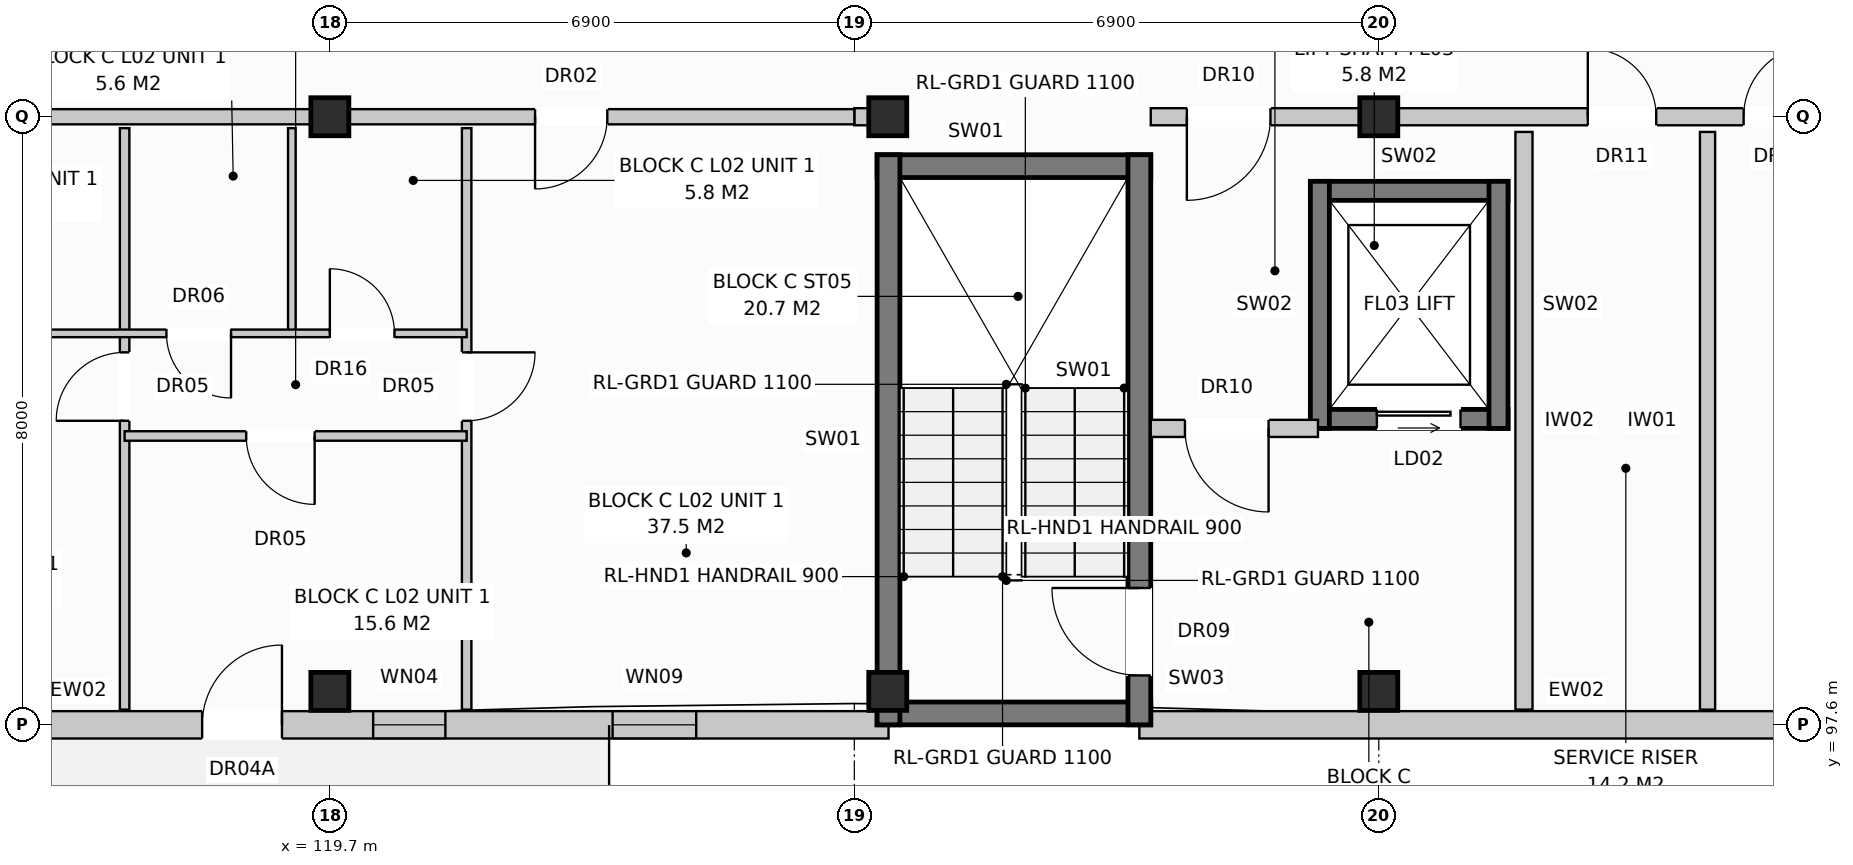
"""IFC4 building model, lengths in metres.
Left out: names, types, materials, properties, quantities, classifications, styles, units other than length and angle.
Written with IfcOpenShell. Run it as: python <this file> out.ifc"""

import sys

from ifc_helpers import new_model, si_unit, direction, frame, frame_2d, origin, origin_with_axes, origin_2d, place, context, subcontext, project, spatial, rectangle, extrude, element, fill, save


model = new_model("IFC4")
c1 = context("Model", 3, precision=1e-05, world=origin(), true_north=direction((0.0, 1.0)))
c2 = subcontext(c1, "Body", "Model", "MODEL_VIEW")
j1 = project(units=[si_unit("LENGTHUNIT", "METRE"), si_unit("PLANEANGLEUNIT", "RADIAN")], contexts=[c1])
p1 = place(None, origin())
s1 = spatial("IfcSite", under=j1, at=p1, CompositionType="ELEMENT")
p2 = place(p1, origin())
s2 = spatial("IfcBuilding", under=s1, at=p2, CompositionType="ELEMENT")
p3 = place(p2, frame((0.0, 0.0, 8.0)))
s3 = spatial("IfcBuildingStorey", under=s2, at=p3, CompositionType="ELEMENT", Elevation=8.0)
for number, where, z_axis, x_axis in (
    (1, (119.7, 98.04, 0.0), (0.0, 0.0, 1.0), (1.0, 0.0, 0.0)),
    (2, (119.7, 105.6, 0.0), (0.0, 0.0, 1.0), (1.0, 0.0, 0.0)),
    (3, (127.04, 98.04, 0.0), (0.0, 0.0, 1.0), (1.0, 0.0, 0.0)),
    (4, (127.04, 105.6, 0.0), (0.0, 0.0, 1.0), (1.0, 0.0, 0.0)),
    (5, (133.5, 98.04, 0.0), (0.0, 0.0, 1.0), (1.0, 0.0, 0.0)),
    (6, (133.5, 105.6, 0.0), (0.0, 0.0, 1.0), (1.0, 0.0, 0.0)),
):
    element("IfcColumn", number, at=place(p3, frame(where, z_axis=z_axis, x_axis=x_axis)), inside=s3, PredefinedType="COLUMN", context=c2, shape_type="SweptSolid", body=[
        extrude(rectangle(XDim=0.5, YDim=0.5, at=origin_2d()), origin(), (0.0, 0.0, 1.0), 3.2),
    ])
p4 = place(p3, frame((112.97, 97.6, 0.0), z_axis=(0.0, 0.0, 1.0), x_axis=(1.0, 0.0, 0.0)))
e7 = element("IfcWall", 7, at=p4, inside=s3, PredefinedType="STANDARD", context=c2, shape_type="SweptSolid", body=[
    extrude(rectangle(XDim=14.08, YDim=0.36, at=frame_2d((7.04, 0.0))), origin(), (0.0, 0.0, 1.0), 2.94),
])
p5 = place(p4, frame((5.05, 0.0, 0.0)))
e8 = element("IfcOpeningElement", 8, at=p5, cuts=e7, PredefinedType="OPENING", context=c2, shape_type="SweptSolid", body=[
    extrude(rectangle(XDim=1.05, YDim=2.12, at=frame_2d((0.525, 1.06))), frame((0.0, 0.192, 0.0), z_axis=(0.0, -1.0, 0.0), x_axis=(1.0, 0.0, 0.0)), (0.0, 0.0, 1.0), 0.384),
])
p6 = place(p4, frame((1.45, 0.0, 0.72)))
e9 = element("IfcOpeningElement", 9, at=p6, cuts=e7, PredefinedType="OPENING", context=c2, shape_type="SweptSolid", body=[
    extrude(rectangle(XDim=1.1, YDim=1.5, at=frame_2d((0.55, 0.75))), frame((0.0, 0.192, 0.0), z_axis=(0.0, -1.0, 0.0), x_axis=(1.0, 0.0, 0.0)), (0.0, 0.0, 1.0), 0.384),
])
p7 = place(p4, frame((7.3, 0.0, 0.9)))
e10 = element("IfcOpeningElement", 10, at=p7, cuts=e7, PredefinedType="OPENING", context=c2, shape_type="SweptSolid", body=[
    extrude(rectangle(XDim=0.95, YDim=1.55, at=frame_2d((0.475, 0.775))), frame((0.0, 0.192, 0.0), z_axis=(0.0, -1.0, 0.0), x_axis=(1.0, 0.0, 0.0)), (0.0, 0.0, 1.0), 0.384),
])
p8 = place(p4, frame((10.45, 0.0, 0.72)))
e11 = element("IfcOpeningElement", 11, at=p8, cuts=e7, PredefinedType="OPENING", context=c2, shape_type="SweptSolid", body=[
    extrude(rectangle(XDim=1.1, YDim=1.5, at=frame_2d((0.55, 0.75))), frame((0.0, 0.192, 0.0), z_axis=(0.0, -1.0, 0.0), x_axis=(1.0, 0.0, 0.0)), (0.0, 0.0, 1.0), 0.384),
])
p9 = place(p3, frame((130.35, 97.6, 0.0), z_axis=(0.0, 0.0, 1.0), x_axis=(1.0, 0.0, 0.0)))
e12 = element("IfcWall", 12, at=p9, inside=s3, PredefinedType="STANDARD", context=c2, shape_type="SweptSolid", body=[
    extrude(rectangle(XDim=17.4, YDim=0.36, at=frame_2d((8.7, 0.0))), origin(), (0.0, 0.0, 1.0), 2.94),
])
p10 = place(p9, frame((11.812, 0.0, 0.0)))
e13 = element("IfcOpeningElement", 13, at=p10, cuts=e12, PredefinedType="OPENING", context=c2, shape_type="SweptSolid", body=[
    extrude(rectangle(XDim=1.05, YDim=2.12, at=frame_2d((0.525, 1.06))), frame((0.0, 0.192, 0.0), z_axis=(0.0, -1.0, 0.0), x_axis=(1.0, 0.0, 0.0)), (0.0, 0.0, 1.0), 0.384),
])
p11 = place(p9, frame((14.87, 0.0, 0.72)))
e14 = element("IfcOpeningElement", 14, at=p11, cuts=e12, PredefinedType="OPENING", context=c2, shape_type="SweptSolid", body=[
    extrude(rectangle(XDim=1.1, YDim=1.5, at=frame_2d((0.55, 0.75))), frame((0.0, 0.192, 0.0), z_axis=(0.0, -1.0, 0.0), x_axis=(1.0, 0.0, 0.0)), (0.0, 0.0, 1.0), 0.384),
])
for number, where, z_axis, x_axis in (
    (15, (126.9, 97.75, 0.0), (0.0, 0.0, 1.0), (1.0, 0.0, 0.0)),
    (16, (126.9, 104.95, 0.0), (0.0, 0.0, 1.0), (1.0, 0.0, 0.0)),
):
    element("IfcWall", number, at=place(p3, frame(where, z_axis=z_axis, x_axis=x_axis)), inside=s3, PredefinedType="SHEAR", context=c2, shape_type="SweptSolid", body=[
        extrude(rectangle(XDim=3.6, YDim=0.3, at=frame_2d((1.8, 0.0))), origin(), (0.0, 0.0, 1.0), 2.94),
    ])
p12 = place(p3, frame((127.05, 97.6, 0.0), z_axis=(0.0, 0.0, 1.0), x_axis=(0.0, 1.0, 0.0)))
e17 = element("IfcWall", 17, at=p12, inside=s3, PredefinedType="SHEAR", context=c2, shape_type="SweptSolid", body=[
    extrude(rectangle(XDim=7.5, YDim=0.3, at=frame_2d((3.75, 0.0))), origin(), (0.0, 0.0, 1.0), 2.94),
])
p13 = place(p3, frame((130.35, 97.6, 0.0), z_axis=(0.0, 0.0, 1.0), x_axis=(0.0, 1.0, 0.0)))
e18 = element("IfcWall", 18, at=p13, inside=s3, PredefinedType="SHEAR", context=c2, shape_type="SweptSolid", body=[
    extrude(rectangle(XDim=7.5, YDim=0.3, at=frame_2d((3.75, 0.0))), origin(), (0.0, 0.0, 1.0), 2.94),
])
p14 = place(p13, frame((0.65, 0.0, 0.0)))
e19 = element("IfcOpeningElement", 19, at=p14, cuts=e18, PredefinedType="OPENING", context=c2, shape_type="SweptSolid", body=[
    extrude(rectangle(XDim=1.15, YDim=2.15, at=frame_2d((0.575, 1.075))), frame((0.0, 0.162, 0.0), z_axis=(0.0, -1.0, 0.0), x_axis=(1.0, 0.0, 0.0)), (0.0, 0.0, 1.0), 0.324),
])
p15 = place(p3, frame((132.6, 101.625, 0.0), z_axis=(0.0, 0.0, 1.0), x_axis=(1.0, 0.0, 0.0)))
e20 = element("IfcWall", 20, at=p15, inside=s3, PredefinedType="SHEAR", context=c2, shape_type="SweptSolid", body=[
    extrude(rectangle(XDim=2.6, YDim=0.25, at=frame_2d((1.3, 0.0))), origin(), (0.0, 0.0, 1.0), 2.94),
])
p16 = place(p15, frame((0.875, 0.0, 0.0)))
e21 = element("IfcOpeningElement", 21, at=p16, cuts=e20, PredefinedType="OPENING", context=c2, shape_type="SweptSolid", body=[
    extrude(rectangle(XDim=1.1, YDim=2.1, at=frame_2d((0.55, 1.05))), frame((0.0, 0.137, 0.0), z_axis=(0.0, -1.0, 0.0), x_axis=(1.0, 0.0, 0.0)), (0.0, 0.0, 1.0), 0.274),
])
p17 = place(p3, frame((132.6, 104.625, 0.0), z_axis=(0.0, 0.0, 1.0), x_axis=(1.0, 0.0, 0.0)))
e22 = element("IfcWall", 22, at=p17, inside=s3, PredefinedType="SHEAR", context=c2, shape_type="SweptSolid", body=[
    extrude(rectangle(XDim=2.6, YDim=0.25, at=frame_2d((1.3, 0.0))), origin(), (0.0, 0.0, 1.0), 2.94),
])
for number, where, z_axis, x_axis in (
    (23, (132.725, 101.5, 0.0), (0.0, 0.0, 1.0), (0.0, 1.0, 0.0)),
    (24, (135.075, 101.5, 0.0), (0.0, 0.0, 1.0), (0.0, 1.0, 0.0)),
):
    element("IfcWall", number, at=place(p3, frame(where, z_axis=z_axis, x_axis=x_axis)), inside=s3, PredefinedType="SHEAR", context=c2, shape_type="SweptSolid", body=[
        extrude(rectangle(XDim=3.25, YDim=0.25, at=frame_2d((1.625, 0.0))), origin(), (0.0, 0.0, 1.0), 2.94),
    ])
p18 = place(p3, frame((135.41, 97.8, 0.0), z_axis=(0.0, 0.0, 1.0), x_axis=(0.0, 1.0, 0.0)))
e25 = element("IfcWall", 25, at=p18, inside=s3, PredefinedType="PARTITIONING", context=c2, shape_type="SweptSolid", body=[
    extrude(rectangle(XDim=7.6, YDim=0.225, at=frame_2d((3.8, 0.0))), origin(), (0.0, 0.0, 1.0), 2.59),
])
p19 = place(p3, frame((130.5, 101.5, 0.0), z_axis=(0.0, 0.0, 1.0), x_axis=(1.0, 0.0, 0.0)))
e26 = element("IfcWall", 26, at=p19, inside=s3, PredefinedType="PARTITIONING", context=c2, shape_type="SweptSolid", body=[
    extrude(rectangle(XDim=2.2, YDim=0.225, at=frame_2d((1.1, 0.0))), origin(), (0.0, 0.0, 1.0), 2.94),
])
p20 = place(p19, frame((0.45, 0.0, 0.0)))
e27 = element("IfcOpeningElement", 27, at=p20, cuts=e26, PredefinedType="OPENING", context=c2, shape_type="SweptSolid", body=[
    extrude(rectangle(XDim=1.1, YDim=2.15, at=frame_2d((0.55, 1.075))), frame((0.0, 0.125, 0.0), z_axis=(0.0, -1.0, 0.0), x_axis=(1.0, 0.0, 0.0)), (0.0, 0.0, 1.0), 0.249),
])
p21 = place(p3, frame((126.6, 105.6, 0.0), z_axis=(0.0, 0.0, 1.0), x_axis=(1.0, 0.0, 0.0)))
e28 = element("IfcWall", 28, at=p21, inside=s3, PredefinedType="PARTITIONING", context=c2, shape_type="SweptSolid", body=[
    extrude(rectangle(XDim=0.3, YDim=0.225, at=frame_2d((0.15, 0.0))), origin(), (0.0, 0.0, 1.0), 2.94),
])
p22 = place(p3, frame((137.825, 97.8, 0.0), z_axis=(0.0, 0.0, 1.0), x_axis=(0.0, 1.0, 0.0)))
e29 = element("IfcWall", 29, at=p22, inside=s3, PredefinedType="PARTITIONING", context=c2, shape_type="SweptSolid", body=[
    extrude(rectangle(XDim=7.6, YDim=0.2, at=frame_2d((3.8, 0.0))), origin(), (0.0, 0.0, 1.0), 2.94),
])
p23 = place(p3, frame((130.5, 105.6, 0.0), z_axis=(0.0, 0.0, 1.0), x_axis=(1.0, 0.0, 0.0)))
e30 = element("IfcWall", 30, at=p23, inside=s3, PredefinedType="PARTITIONING", context=c2, shape_type="SweptSolid", body=[
    extrude(rectangle(XDim=9.9, YDim=0.225, at=frame_2d((4.95, 0.0))), origin(), (0.0, 0.0, 1.0), 2.38),
])
p24 = place(p23, frame((0.475, 0.0, 0.0)))
e31 = element("IfcOpeningElement", 31, at=p24, cuts=e30, PredefinedType="OPENING", context=c2, shape_type="SweptSolid", body=[
    extrude(rectangle(XDim=1.1, YDim=2.15, at=frame_2d((0.55, 1.075))), frame((0.0, 0.125, 0.0), z_axis=(0.0, -1.0, 0.0), x_axis=(1.0, 0.0, 0.0)), (0.0, 0.0, 1.0), 0.249),
])
p25 = place(p23, frame((5.75, 0.0, 0.0)))
e32 = element("IfcOpeningElement", 32, at=p25, cuts=e30, PredefinedType="OPENING", context=c2, shape_type="SweptSolid", body=[
    extrude(rectangle(XDim=0.9, YDim=2.1, at=frame_2d((0.45, 1.05))), frame((0.0, 0.125, 0.0), z_axis=(0.0, -1.0, 0.0), x_axis=(1.0, 0.0, 0.0)), (0.0, 0.0, 1.0), 0.249),
])
p26 = place(p23, frame((7.8, 0.0, 0.0)))
e33 = element("IfcOpeningElement", 33, at=p26, cuts=e30, PredefinedType="OPENING", context=c2, shape_type="SweptSolid", body=[
    extrude(rectangle(XDim=0.95, YDim=2.15, at=frame_2d((0.475, 1.075))), frame((0.0, 0.125, 0.0), z_axis=(0.0, -1.0, 0.0), x_axis=(1.0, 0.0, 0.0)), (0.0, 0.0, 1.0), 0.249),
])
p27 = place(p3, frame((112.8, 105.6, 0.0), z_axis=(0.0, 0.0, 1.0), x_axis=(1.0, 0.0, 0.0)))
e34 = element("IfcWall", 34, at=p27, inside=s3, PredefinedType="PARTITIONING", context=c2, shape_type="SweptSolid", body=[
    extrude(rectangle(XDim=13.8, YDim=0.2, at=frame_2d((6.9, 0.0))), origin(), (0.0, 0.0, 1.0), 2.38),
])
p28 = place(p27, frame((9.6, 0.0, 0.0)))
e35 = element("IfcOpeningElement", 35, at=p28, cuts=e34, PredefinedType="OPENING", context=c2, shape_type="SweptSolid", body=[
    extrude(rectangle(XDim=0.95, YDim=2.15, at=frame_2d((0.475, 1.075))), frame((0.0, 0.112, 0.0), z_axis=(0.0, -1.0, 0.0), x_axis=(1.0, 0.0, 0.0)), (0.0, 0.0, 1.0), 0.224),
])
p29 = place(p3, frame((121.5, 105.45, 0.0), z_axis=(0.0, 0.0, 1.0), x_axis=(0.0, -1.0, 0.0)))
e36 = element("IfcWall", 36, at=p29, inside=s3, PredefinedType="PARTITIONING", context=c2, shape_type="SweptSolid", body=[
    extrude(rectangle(XDim=7.65, YDim=0.125, at=frame_2d((3.825, 0.0))), origin(), (0.0, 0.0, 1.0), 2.94),
])
p30 = place(p29, frame((2.95, 0.0, 0.0)))
e37 = element("IfcOpeningElement", 37, at=p30, cuts=e36, PredefinedType="OPENING", context=c2, shape_type="SweptSolid", body=[
    extrude(rectangle(XDim=0.9, YDim=2.1, at=frame_2d((0.45, 1.05))), frame((0.0, 0.074, 0.0), z_axis=(0.0, -1.0, 0.0), x_axis=(1.0, 0.0, 0.0)), (0.0, 0.0, 1.0), 0.149),
])
p31 = place(p3, frame((117.0, 105.45, 0.0), z_axis=(0.0, 0.0, 1.0), x_axis=(0.0, -1.0, 0.0)))
e38 = element("IfcWall", 38, at=p31, inside=s3, PredefinedType="PARTITIONING", context=c2, shape_type="SweptSolid", body=[
    extrude(rectangle(XDim=7.65, YDim=0.125, at=frame_2d((3.825, 0.0))), origin(), (0.0, 0.0, 1.0), 2.94),
])
p32 = place(p31, frame((2.95, 0.0, 0.0)))
e39 = element("IfcOpeningElement", 39, at=p32, cuts=e38, PredefinedType="OPENING", context=c2, shape_type="SweptSolid", body=[
    extrude(rectangle(XDim=0.9, YDim=2.1, at=frame_2d((0.45, 1.05))), frame((0.0, 0.074, 0.0), z_axis=(0.0, -1.0, 0.0), x_axis=(1.0, 0.0, 0.0)), (0.0, 0.0, 1.0), 0.149),
])
p33 = place(p3, frame((119.2, 105.45, 0.0), z_axis=(0.0, 0.0, 1.0), x_axis=(0.0, -1.0, 0.0)))
e40 = element("IfcWall", 40, at=p33, inside=s3, PredefinedType="PARTITIONING", context=c2, shape_type="SweptSolid", body=[
    extrude(rectangle(XDim=2.7, YDim=0.1, at=frame_2d((1.35, 0.0))), origin(), (0.0, 0.0, 1.0), 2.94),
])
p34 = place(p3, frame((112.9, 102.75, 0.0), z_axis=(0.0, 0.0, 1.0), x_axis=(1.0, 0.0, 0.0)))
e41 = element("IfcWall", 41, at=p34, inside=s3, PredefinedType="PARTITIONING", context=c2, shape_type="SweptSolid", body=[
    extrude(rectangle(XDim=8.6, YDim=0.1, at=frame_2d((4.3, 0.0))), origin(), (0.0, 0.0, 1.0), 2.94),
])
p35 = place(p34, frame((1.4, 0.0, 0.0)))
e42 = element("IfcOpeningElement", 42, at=p35, cuts=e41, PredefinedType="OPENING", context=c2, shape_type="SweptSolid", body=[
    extrude(rectangle(XDim=0.85, YDim=2.05, at=frame_2d((0.425, 1.025))), frame((0.0, 0.062, 0.0), z_axis=(0.0, -1.0, 0.0), x_axis=(1.0, 0.0, 0.0)), (0.0, 0.0, 1.0), 0.124),
])
p36 = place(p34, frame((4.65, 0.0, 0.0)))
e43 = element("IfcOpeningElement", 43, at=p36, cuts=e41, PredefinedType="OPENING", context=c2, shape_type="SweptSolid", body=[
    extrude(rectangle(XDim=0.85, YDim=2.05, at=frame_2d((0.425, 1.025))), frame((0.0, 0.062, 0.0), z_axis=(0.0, -1.0, 0.0), x_axis=(1.0, 0.0, 0.0)), (0.0, 0.0, 1.0), 0.124),
])
p37 = place(p34, frame((6.8, 0.0, 0.0)))
e44 = element("IfcOpeningElement", 44, at=p37, cuts=e41, PredefinedType="OPENING", context=c2, shape_type="SweptSolid", body=[
    extrude(rectangle(XDim=0.85, YDim=2.1, at=frame_2d((0.425, 1.05))), frame((0.0, 0.062, 0.0), z_axis=(0.0, -1.0, 0.0), x_axis=(1.0, 0.0, 0.0)), (0.0, 0.0, 1.0), 0.124),
])
p38 = place(p3, frame((117.0, 101.4, 0.0), z_axis=(0.0, 0.0, 1.0), x_axis=(1.0, 0.0, 0.0)))
e45 = element("IfcWall", 45, at=p38, inside=s3, PredefinedType="PARTITIONING", context=c2, shape_type="SweptSolid", body=[
    extrude(rectangle(XDim=4.5, YDim=0.125, at=frame_2d((2.25, 0.0))), origin(), (0.0, 0.0, 1.0), 2.94),
])
p39 = place(p38, frame((1.6, 0.0, 0.0)))
e46 = element("IfcOpeningElement", 46, at=p39, cuts=e45, PredefinedType="OPENING", context=c2, shape_type="SweptSolid", body=[
    extrude(rectangle(XDim=0.9, YDim=2.1, at=frame_2d((0.45, 1.05))), frame((0.0, 0.074, 0.0), z_axis=(0.0, -1.0, 0.0), x_axis=(1.0, 0.0, 0.0)), (0.0, 0.0, 1.0), 0.149),
])
p40 = place(p5, origin_with_axes())
e47 = element("IfcDoor", 47, at=p40, inside=s3, OperationType="SINGLE_SWING_RIGHT", PredefinedType="DOOR", context=c2, shape_type="SweptSolid", body=[
    extrude(rectangle(XDim=1.05, YDim=2.12, at=frame_2d((0.525, 1.06))), frame((0.0, 0.025, 0.0), z_axis=(0.0, -1.0, 0.0), x_axis=(1.0, 0.0, 0.0)), (0.0, 0.0, 1.0), 0.05),
])
fill(e8, e47)
p41 = place(p7, origin_with_axes())
e48 = element("IfcWindow", 48, at=p41, inside=s3, PartitioningType="SINGLE_PANEL", PredefinedType="WINDOW", context=c2, shape_type="SweptSolid", body=[
    extrude(rectangle(XDim=0.95, YDim=1.55, at=frame_2d((0.475, 0.775))), frame((0.0, 0.03, 0.0), z_axis=(0.0, -1.0, 0.0), x_axis=(1.0, 0.0, 0.0)), (0.0, 0.0, 1.0), 0.06),
])
fill(e10, e48)
p42 = place(p8, origin_with_axes())
e49 = element("IfcWindow", 49, at=p42, inside=s3, PartitioningType="SINGLE_PANEL", PredefinedType="WINDOW", context=c2, shape_type="SweptSolid", body=[
    extrude(rectangle(XDim=1.1, YDim=1.5, at=frame_2d((0.55, 0.75))), frame((0.0, 0.03, 0.0), z_axis=(0.0, -1.0, 0.0), x_axis=(1.0, 0.0, 0.0)), (0.0, 0.0, 1.0), 0.06),
])
fill(e11, e49)
p43 = place(p14, origin_with_axes())
e50 = element("IfcDoor", 50, at=p43, inside=s3, OperationType="SINGLE_SWING_RIGHT", PredefinedType="DOOR", context=c2, shape_type="SweptSolid", body=[
    extrude(rectangle(XDim=1.15, YDim=2.15, at=frame_2d((0.575, 1.075))), frame((0.0, 0.025, 0.0), z_axis=(0.0, -1.0, 0.0), x_axis=(1.0, 0.0, 0.0)), (0.0, 0.0, 1.0), 0.05),
])
fill(e19, e50)
p44 = place(p16, origin_with_axes())
e51 = element("IfcDoor", 51, at=p44, inside=s3, OperationType="SLIDING_TO_LEFT", PredefinedType="DOOR", context=c2, shape_type="SweptSolid", body=[
    extrude(rectangle(XDim=1.1, YDim=2.1, at=frame_2d((0.55, 1.05))), frame((0.0, 0.025, 0.0), z_axis=(0.0, -1.0, 0.0), x_axis=(1.0, 0.0, 0.0)), (0.0, 0.0, 1.0), 0.05),
])
fill(e21, e51)
p45 = place(p20, frame((1.1, 0.0, 0.0), z_axis=(0.0, 0.0, 1.0), x_axis=(-1.0, 0.0, 0.0)))
e52 = element("IfcDoor", 52, at=p45, inside=s3, OperationType="SINGLE_SWING_RIGHT", PredefinedType="DOOR", context=c2, shape_type="SweptSolid", body=[
    extrude(rectangle(XDim=1.1, YDim=2.15, at=frame_2d((0.55, 1.075))), frame((0.0, 0.025, 0.0), z_axis=(0.0, -1.0, 0.0), x_axis=(1.0, 0.0, 0.0)), (0.0, 0.0, 1.0), 0.05),
])
fill(e27, e52)
p46 = place(p24, frame((1.1, 0.0, 0.0), z_axis=(0.0, 0.0, 1.0), x_axis=(-1.0, 0.0, 0.0)))
e53 = element("IfcDoor", 53, at=p46, inside=s3, OperationType="SINGLE_SWING_LEFT", PredefinedType="DOOR", context=c2, shape_type="SweptSolid", body=[
    extrude(rectangle(XDim=1.1, YDim=2.15, at=frame_2d((0.55, 1.075))), frame((0.0, 0.025, 0.0), z_axis=(0.0, -1.0, 0.0), x_axis=(1.0, 0.0, 0.0)), (0.0, 0.0, 1.0), 0.05),
])
fill(e31, e53)
p47 = place(p25, origin_with_axes())
e54 = element("IfcDoor", 54, at=p47, inside=s3, OperationType="SINGLE_SWING_LEFT", PredefinedType="DOOR", context=c2, shape_type="SweptSolid", body=[
    extrude(rectangle(XDim=0.9, YDim=2.1, at=frame_2d((0.45, 1.05))), frame((0.0, 0.025, 0.0), z_axis=(0.0, -1.0, 0.0), x_axis=(1.0, 0.0, 0.0)), (0.0, 0.0, 1.0), 0.05),
])
fill(e32, e54)
p48 = place(p26, origin_with_axes())
e55 = element("IfcDoor", 55, at=p48, inside=s3, OperationType="SINGLE_SWING_RIGHT", PredefinedType="DOOR", context=c2, shape_type="SweptSolid", body=[
    extrude(rectangle(XDim=0.95, YDim=2.15, at=frame_2d((0.475, 1.075))), frame((0.0, 0.025, 0.0), z_axis=(0.0, -1.0, 0.0), x_axis=(1.0, 0.0, 0.0)), (0.0, 0.0, 1.0), 0.05),
])
fill(e33, e55)
p49 = place(p28, frame((0.95, 0.0, 0.0), z_axis=(0.0, 0.0, 1.0), x_axis=(-1.0, 0.0, 0.0)))
e56 = element("IfcDoor", 56, at=p49, inside=s3, OperationType="SINGLE_SWING_LEFT", PredefinedType="DOOR", context=c2, shape_type="SweptSolid", body=[
    extrude(rectangle(XDim=0.95, YDim=2.15, at=frame_2d((0.475, 1.075))), frame((0.0, 0.025, 0.0), z_axis=(0.0, -1.0, 0.0), x_axis=(1.0, 0.0, 0.0)), (0.0, 0.0, 1.0), 0.05),
])
fill(e35, e56)
p50 = place(p30, origin_with_axes())
e57 = element("IfcDoor", 57, at=p50, inside=s3, OperationType="SINGLE_SWING_LEFT", PredefinedType="DOOR", context=c2, shape_type="SweptSolid", body=[
    extrude(rectangle(XDim=0.9, YDim=2.1, at=frame_2d((0.45, 1.05))), frame((0.0, 0.025, 0.0), z_axis=(0.0, -1.0, 0.0), x_axis=(1.0, 0.0, 0.0)), (0.0, 0.0, 1.0), 0.05),
])
fill(e37, e57)
p51 = place(p32, frame((0.9, 0.0, 0.0), z_axis=(0.0, 0.0, 1.0), x_axis=(-1.0, 0.0, 0.0)))
e58 = element("IfcDoor", 58, at=p51, inside=s3, OperationType="SINGLE_SWING_RIGHT", PredefinedType="DOOR", context=c2, shape_type="SweptSolid", body=[
    extrude(rectangle(XDim=0.9, YDim=2.1, at=frame_2d((0.45, 1.05))), frame((0.0, 0.025, 0.0), z_axis=(0.0, -1.0, 0.0), x_axis=(1.0, 0.0, 0.0)), (0.0, 0.0, 1.0), 0.05),
])
fill(e39, e58)
p52 = place(p36, frame((0.85, 0.0, 0.0), z_axis=(0.0, 0.0, 1.0), x_axis=(-1.0, 0.0, 0.0)))
e59 = element("IfcDoor", 59, at=p52, inside=s3, OperationType="SINGLE_SWING_RIGHT", PredefinedType="DOOR", context=c2, shape_type="SweptSolid", body=[
    extrude(rectangle(XDim=0.85, YDim=2.05, at=frame_2d((0.425, 1.025))), frame((0.0, 0.025, 0.0), z_axis=(0.0, -1.0, 0.0), x_axis=(1.0, 0.0, 0.0)), (0.0, 0.0, 1.0), 0.05),
])
fill(e43, e59)
p53 = place(p37, origin_with_axes())
e60 = element("IfcDoor", 60, at=p53, inside=s3, OperationType="SINGLE_SWING_LEFT", PredefinedType="DOOR", context=c2, shape_type="SweptSolid", body=[
    extrude(rectangle(XDim=0.85, YDim=2.1, at=frame_2d((0.425, 1.05))), frame((0.0, 0.025, 0.0), z_axis=(0.0, -1.0, 0.0), x_axis=(1.0, 0.0, 0.0)), (0.0, 0.0, 1.0), 0.05),
])
fill(e44, e60)
p54 = place(p39, frame((0.9, 0.0, 0.0), z_axis=(0.0, 0.0, 1.0), x_axis=(-1.0, 0.0, 0.0)))
e61 = element("IfcDoor", 61, at=p54, inside=s3, OperationType="SINGLE_SWING_RIGHT", PredefinedType="DOOR", context=c2, shape_type="SweptSolid", body=[
    extrude(rectangle(XDim=0.9, YDim=2.1, at=frame_2d((0.45, 1.05))), frame((0.0, 0.025, 0.0), z_axis=(0.0, -1.0, 0.0), x_axis=(1.0, 0.0, 0.0)), (0.0, 0.0, 1.0), 0.05),
])
fill(e46, e61)
save(model, sys.argv[1])
